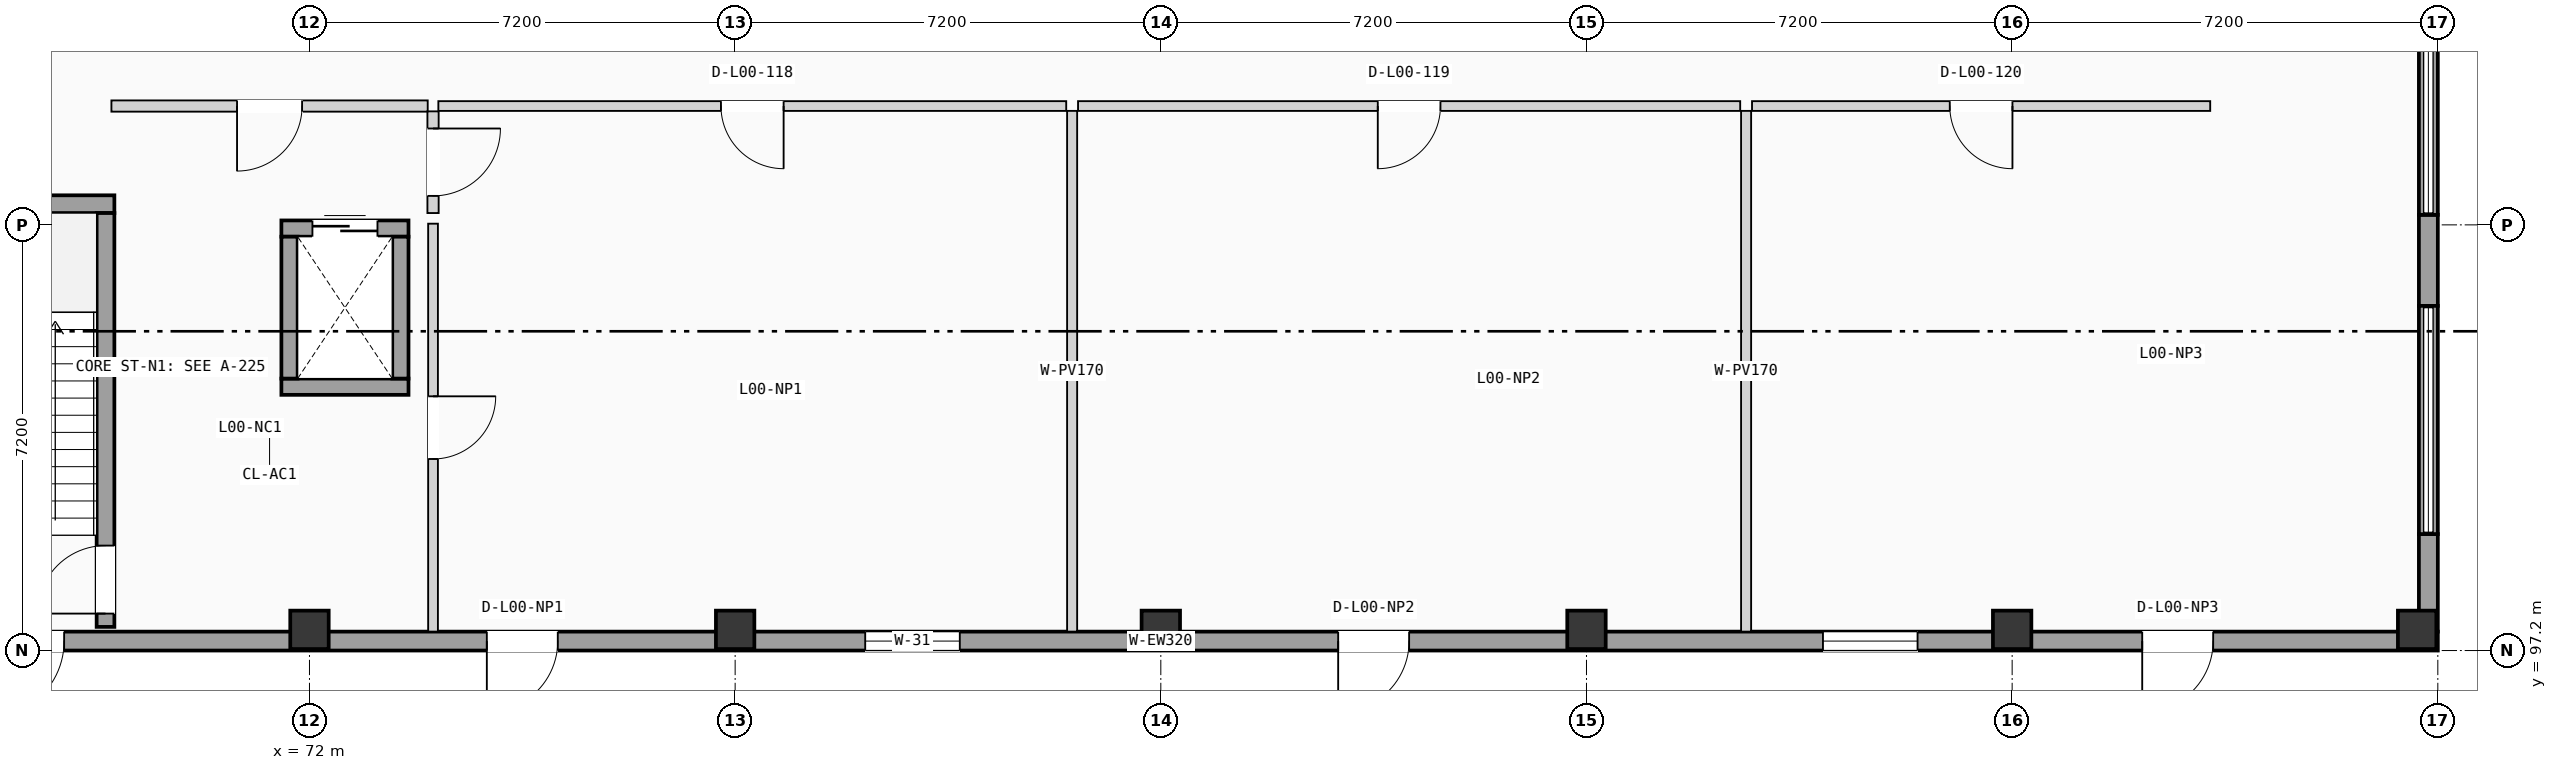
"""IFC4 building model, lengths in metres.
Left out: names, types, materials, properties, quantities, classifications, styles, units other than length and angle.
Written with IfcOpenShell. Run it as: python <this file> out.ifc"""

import sys

from ifc_helpers import new_model, si_unit, direction, frame, frame_2d, origin, origin_2d, place, context, subcontext, project, spatial, rectangle, circle, extrude, element, fill, save


model = new_model("IFC4")
c1 = context("Model", 3, precision=1e-05, world=origin(), true_north=direction((0.0, 1.0)))
c2 = subcontext(c1, "Body", "Model", "MODEL_VIEW")
j1 = project(units=[si_unit("LENGTHUNIT", "METRE"), si_unit("PLANEANGLEUNIT", "RADIAN")], contexts=[c1])
p1 = place(None, origin())
s1 = spatial("IfcSite", under=j1, at=p1, CompositionType="ELEMENT")
p2 = place(p1, origin())
s2 = spatial("IfcBuilding", under=s1, at=p2, CompositionType="ELEMENT")
p3 = place(p2, origin())
s3 = spatial("IfcBuildingStorey", under=s2, at=p3, CompositionType="ELEMENT", Elevation=0.0)
for number, where, z_axis, x_axis in (
    (1, (72.0, 97.55, 0.0), (0.0, 0.0, 1.0), (1.0, 0.0, 0.0)),
    (2, (79.2, 97.55, 0.0), (0.0, 0.0, 1.0), (1.0, 0.0, 0.0)),
    (3, (86.4, 97.55, 0.0), (0.0, 0.0, 1.0), (1.0, 0.0, 0.0)),
    (4, (93.6, 97.55, 0.0), (0.0, 0.0, 1.0), (1.0, 0.0, 0.0)),
    (5, (100.8, 97.55, 0.0), (0.0, 0.0, 1.0), (1.0, 0.0, 0.0)),
    (6, (107.65, 97.55, 0.0), (0.0, 0.0, 1.0), (1.0, 0.0, 0.0)),
):
    element("IfcColumn", number, at=place(p3, frame(where, z_axis=z_axis, x_axis=x_axis)), inside=s3, PredefinedType="COLUMN", context=c2, shape_type="SweptSolid", body=[
        extrude(circle(Radius=0.325, at=origin_2d()), origin(), (0.0, 0.0, 1.0), 4.9),
    ])
p4 = place(p3, frame((64.8, 97.36, 0.0), z_axis=(0.0, 0.0, 1.0), x_axis=(1.0, 0.0, 0.0)))
e7 = element("IfcWall", 7, at=p4, inside=s3, PredefinedType="SOLIDWALL", context=c2, shape_type="SweptSolid", body=[
    extrude(rectangle(XDim=43.2, YDim=0.32, at=frame_2d((21.6, 0.0))), origin(), (0.0, 0.0, 1.0), 4.63),
])
p5 = place(p4, frame((1.75, 0.0, 0.0)))
e8 = element("IfcOpeningElement", 8, at=p5, cuts=e7, PredefinedType="OPENING", context=c2, shape_type="SweptSolid", body=[
    extrude(rectangle(XDim=1.3, YDim=2.2, at=frame_2d((0.65, 1.1))), frame((0.0, 0.17, 0.0), z_axis=(0.0, -1.0, 0.0), x_axis=(1.0, 0.0, 0.0)), (0.0, 0.0, 1.0), 0.34),
])
p6 = place(p4, frame((10.2, 0.0, 0.0)))
e9 = element("IfcOpeningElement", 9, at=p6, cuts=e7, PredefinedType="OPENING", context=c2, shape_type="SweptSolid", body=[
    extrude(rectangle(XDim=1.2, YDim=2.15, at=frame_2d((0.6, 1.075))), frame((0.0, 0.17, 0.0), z_axis=(0.0, -1.0, 0.0), x_axis=(1.0, 0.0, 0.0)), (0.0, 0.0, 1.0), 0.34),
])
p7 = place(p4, frame((24.6, 0.0, 0.0)))
e10 = element("IfcOpeningElement", 10, at=p7, cuts=e7, PredefinedType="OPENING", context=c2, shape_type="SweptSolid", body=[
    extrude(rectangle(XDim=1.2, YDim=2.15, at=frame_2d((0.6, 1.075))), frame((0.0, 0.17, 0.0), z_axis=(0.0, -1.0, 0.0), x_axis=(1.0, 0.0, 0.0)), (0.0, 0.0, 1.0), 0.34),
])
p8 = place(p4, frame((38.2, 0.0, 0.0)))
e11 = element("IfcOpeningElement", 11, at=p8, cuts=e7, PredefinedType="OPENING", context=c2, shape_type="SweptSolid", body=[
    extrude(rectangle(XDim=1.2, YDim=2.15, at=frame_2d((0.6, 1.075))), frame((0.0, 0.17, 0.0), z_axis=(0.0, -1.0, 0.0), x_axis=(1.0, 0.0, 0.0)), (0.0, 0.0, 1.0), 0.34),
])
p9 = place(p4, frame((16.6, 0.0, 0.8)))
e12 = element("IfcOpeningElement", 12, at=p9, cuts=e7, PredefinedType="OPENING", context=c2, shape_type="SweptSolid", body=[
    extrude(rectangle(XDim=1.6, YDim=1.2, at=frame_2d((0.8, 0.6))), frame((0.0, 0.17, 0.0), z_axis=(0.0, -1.0, 0.0), x_axis=(1.0, 0.0, 0.0)), (0.0, 0.0, 1.0), 0.34),
])
p10 = place(p4, frame((32.8, 0.0, 0.8)))
e13 = element("IfcOpeningElement", 13, at=p10, cuts=e7, PredefinedType="OPENING", context=c2, shape_type="SweptSolid", body=[
    extrude(rectangle(XDim=1.6, YDim=1.2, at=frame_2d((0.8, 0.6))), frame((0.0, 0.17, 0.0), z_axis=(0.0, -1.0, 0.0), x_axis=(1.0, 0.0, 0.0)), (0.0, 0.0, 1.0), 0.34),
])
p11 = place(p3, frame((107.84, 97.52, 0.0), z_axis=(0.0, 0.0, 1.0), x_axis=(0.0, 1.0, 0.0)))
e14 = element("IfcWall", 14, at=p11, inside=s3, PredefinedType="SOLIDWALL", context=c2, shape_type="SweptSolid", body=[
    extrude(rectangle(XDim=1.65, YDim=0.32, at=frame_2d((0.825, 0.0))), origin(), (0.0, 0.0, 1.0), 4.63),
])
p12 = place(p3, frame((107.84, 103.03, 0.0), z_axis=(0.0, 0.0, 1.0), x_axis=(0.0, 1.0, 0.0)))
e15 = element("IfcWall", 15, at=p12, inside=s3, PredefinedType="SOLIDWALL", context=c2, shape_type="SweptSolid", body=[
    extrude(rectangle(XDim=1.54, YDim=0.32, at=frame_2d((0.77, 0.0))), origin(), (0.0, 0.0, 1.0), 4.63),
])
p13 = place(p3, frame((107.84, 99.17, 0.0), z_axis=(0.0, 0.0, 1.0), x_axis=(0.0, 1.0, 0.0)))
e16 = element("IfcWall", 16, at=p13, inside=s3, PredefinedType="SOLIDWALL", context=c2, shape_type="SweptSolid", body=[
    extrude(rectangle(XDim=3.86, YDim=0.32, at=frame_2d((1.93, 0.0))), origin(), (0.0, 0.0, 1.0), 1.11),
])
p14 = place(p3, frame((107.84, 104.57, 0.0), z_axis=(0.0, 0.0, 1.0), x_axis=(0.0, 1.0, 0.0)))
e17 = element("IfcWall", 17, at=p14, inside=s3, PredefinedType="SOLIDWALL", context=c2, shape_type="SweptSolid", body=[
    extrude(rectangle(XDim=3.86, YDim=0.32, at=frame_2d((1.93, 0.0))), origin(), (0.0, 0.0, 1.0), 1.11),
])
p15 = place(p3, frame((65.1, 104.75, 0.0), z_axis=(0.0, 0.0, 1.0), x_axis=(1.0, 0.0, 0.0)))
e18 = element("IfcWall", 18, at=p15, inside=s3, PredefinedType="SHEAR", context=c2, shape_type="SweptSolid", body=[
    extrude(rectangle(XDim=3.6, YDim=0.3, at=frame_2d((1.8, 0.0))), origin(), (0.0, 0.0, 1.0), 4.63),
])
p16 = place(p3, frame((68.55, 97.6, 0.0), z_axis=(0.0, 0.0, 1.0), x_axis=(0.0, 1.0, 0.0)))
e19 = element("IfcWall", 19, at=p16, inside=s3, PredefinedType="SHEAR", context=c2, shape_type="SweptSolid", body=[
    extrude(rectangle(XDim=7.0, YDim=0.3, at=frame_2d((3.5, 0.0))), origin(), (0.0, 0.0, 1.0), 4.63),
])
p17 = place(p16, frame((0.225, 0.0, 0.0)))
e20 = element("IfcOpeningElement", 20, at=p17, cuts=e19, PredefinedType="OPENING", context=c2, shape_type="SweptSolid", body=[
    extrude(rectangle(XDim=1.15, YDim=2.12, at=frame_2d((0.575, 1.06))), frame((0.0, 0.16, 0.0), z_axis=(0.0, -1.0, 0.0), x_axis=(1.0, 0.0, 0.0)), (0.0, 0.0, 1.0), 0.32),
])
p18 = place(p3, frame((71.525, 101.663, 0.0), z_axis=(0.0, 0.0, 1.0), x_axis=(1.0, 0.0, 0.0)))
e21 = element("IfcWall", 21, at=p18, inside=s3, PredefinedType="SHEAR", context=c2, shape_type="SweptSolid", body=[
    extrude(rectangle(XDim=2.15, YDim=0.275, at=frame_2d((1.075, 0.0))), origin(), (0.0, 0.0, 1.0), 4.63),
])
p19 = place(p3, frame((71.525, 104.337, 0.0), z_axis=(0.0, 0.0, 1.0), x_axis=(1.0, 0.0, 0.0)))
e22 = element("IfcWall", 22, at=p19, inside=s3, PredefinedType="SHEAR", context=c2, shape_type="SweptSolid", body=[
    extrude(rectangle(XDim=2.15, YDim=0.275, at=frame_2d((1.075, 0.0))), origin(), (0.0, 0.0, 1.0), 4.63),
])
p20 = place(p19, frame((0.525, 0.0, 0.0)))
e23 = element("IfcOpeningElement", 23, at=p20, cuts=e22, PredefinedType="OPENING", context=c2, shape_type="SweptSolid", body=[
    extrude(rectangle(XDim=1.1, YDim=2.15, at=frame_2d((0.55, 1.075))), frame((0.0, 0.147, 0.0), z_axis=(0.0, -1.0, 0.0), x_axis=(1.0, 0.0, 0.0)), (0.0, 0.0, 1.0), 0.295),
])
for number, where, z_axis, x_axis in (
    (24, (71.663, 101.8, 0.0), (0.0, 0.0, 1.0), (0.0, 1.0, 0.0)),
    (25, (73.538, 101.8, 0.0), (0.0, 0.0, 1.0), (0.0, 1.0, 0.0)),
):
    element("IfcWall", number, at=place(p3, frame(where, z_axis=z_axis, x_axis=x_axis)), inside=s3, PredefinedType="SHEAR", context=c2, shape_type="SweptSolid", body=[
        extrude(rectangle(XDim=2.4, YDim=0.275, at=frame_2d((1.2, 0.0))), origin(), (0.0, 0.0, 1.0), 4.63),
    ])
p21 = place(p3, frame((74.09, 97.52, 0.0), z_axis=(0.0, 0.0, 1.0), x_axis=(0.0, 1.0, 0.0)))
e26 = element("IfcWall", 26, at=p21, inside=s3, PredefinedType="PARTITIONING", context=c2, shape_type="SweptSolid", body=[
    extrude(rectangle(XDim=6.9, YDim=0.165, at=frame_2d((3.45, 0.0))), origin(), (0.0, 0.0, 1.0), 3.84),
])
p22 = place(p21, frame((2.92, 0.0, 0.0)))
e27 = element("IfcOpeningElement", 27, at=p22, cuts=e26, PredefinedType="OPENING", context=c2, shape_type="SweptSolid", body=[
    extrude(rectangle(XDim=1.06, YDim=2.14, at=frame_2d((0.53, 1.07))), frame((0.0, 0.093, 0.0), z_axis=(0.0, -1.0, 0.0), x_axis=(1.0, 0.0, 0.0)), (0.0, 0.0, 1.0), 0.185),
])
p23 = place(p3, frame((68.65, 106.41, 0.0), z_axis=(0.0, 0.0, 1.0), x_axis=(1.0, 0.0, 0.0)))
e28 = element("IfcWall", 28, at=p23, inside=s3, PredefinedType="PARTITIONING", context=c2, shape_type="SweptSolid", body=[
    extrude(rectangle(XDim=5.35, YDim=0.19, at=frame_2d((2.675, 0.0))), origin(), (0.0, 0.0, 1.0), 3.84),
])
p24 = place(p23, frame((2.125, 0.0, 0.0)))
e29 = element("IfcOpeningElement", 29, at=p24, cuts=e28, PredefinedType="OPENING", context=c2, shape_type="SweptSolid", body=[
    extrude(rectangle(XDim=1.1, YDim=2.12, at=frame_2d((0.55, 1.06))), frame((0.0, 0.105, 0.0), z_axis=(0.0, -1.0, 0.0), x_axis=(1.0, 0.0, 0.0)), (0.0, 0.0, 1.0), 0.21),
])
p25 = place(p3, frame((74.09, 104.6, 0.0), z_axis=(0.0, 0.0, 1.0), x_axis=(0.0, 1.0, 0.0)))
e30 = element("IfcWall", 30, at=p25, inside=s3, PredefinedType="PARTITIONING", context=c2, shape_type="SweptSolid", body=[
    extrude(rectangle(XDim=1.72, YDim=0.19, at=frame_2d((0.86, 0.0))), origin(), (0.0, 0.0, 1.0), 3.84),
])
p26 = place(p25, frame((0.29, 0.0, 0.0)))
e31 = element("IfcOpeningElement", 31, at=p26, cuts=e30, PredefinedType="OPENING", context=c2, shape_type="SweptSolid", body=[
    extrude(rectangle(XDim=1.14, YDim=2.18, at=frame_2d((0.57, 1.09))), frame((0.0, 0.105, 0.0), z_axis=(0.0, -1.0, 0.0), x_axis=(1.0, 0.0, 0.0)), (0.0, 0.0, 1.0), 0.21),
])
p27 = place(p3, frame((74.18, 106.41, 0.0), z_axis=(0.0, 0.0, 1.0), x_axis=(1.0, 0.0, 0.0)))
e32 = element("IfcWall", 32, at=p27, inside=s3, PredefinedType="PARTITIONING", context=c2, shape_type="SweptSolid", body=[
    extrude(rectangle(XDim=10.62, YDim=0.165, at=frame_2d((5.31, 0.0))), origin(), (0.0, 0.0, 1.0), 3.84),
])
p28 = place(p27, frame((4.78, 0.0, 0.0)))
e33 = element("IfcOpeningElement", 33, at=p28, cuts=e32, PredefinedType="OPENING", context=c2, shape_type="SweptSolid", body=[
    extrude(rectangle(XDim=1.06, YDim=2.14, at=frame_2d((0.53, 1.07))), frame((0.0, 0.093, 0.0), z_axis=(0.0, -1.0, 0.0), x_axis=(1.0, 0.0, 0.0)), (0.0, 0.0, 1.0), 0.185),
])
p29 = place(p3, frame((85.0, 106.41, 0.0), z_axis=(0.0, 0.0, 1.0), x_axis=(1.0, 0.0, 0.0)))
e34 = element("IfcWall", 34, at=p29, inside=s3, PredefinedType="PARTITIONING", context=c2, shape_type="SweptSolid", body=[
    extrude(rectangle(XDim=11.2, YDim=0.165, at=frame_2d((5.6, 0.0))), origin(), (0.0, 0.0, 1.0), 3.84),
])
p30 = place(p29, frame((5.07, 0.0, 0.0)))
e35 = element("IfcOpeningElement", 35, at=p30, cuts=e34, PredefinedType="OPENING", context=c2, shape_type="SweptSolid", body=[
    extrude(rectangle(XDim=1.06, YDim=2.14, at=frame_2d((0.53, 1.07))), frame((0.0, 0.093, 0.0), z_axis=(0.0, -1.0, 0.0), x_axis=(1.0, 0.0, 0.0)), (0.0, 0.0, 1.0), 0.185),
])
p31 = place(p3, frame((96.4, 106.41, 0.0), z_axis=(0.0, 0.0, 1.0), x_axis=(1.0, 0.0, 0.0)))
e36 = element("IfcWall", 36, at=p31, inside=s3, PredefinedType="PARTITIONING", context=c2, shape_type="SweptSolid", body=[
    extrude(rectangle(XDim=7.75, YDim=0.165, at=frame_2d((3.875, 0.0))), origin(), (0.0, 0.0, 1.0), 3.84),
])
p32 = place(p31, frame((3.345, 0.0, 0.0)))
e37 = element("IfcOpeningElement", 37, at=p32, cuts=e36, PredefinedType="OPENING", context=c2, shape_type="SweptSolid", body=[
    extrude(rectangle(XDim=1.06, YDim=2.14, at=frame_2d((0.53, 1.07))), frame((0.0, 0.093, 0.0), z_axis=(0.0, -1.0, 0.0), x_axis=(1.0, 0.0, 0.0)), (0.0, 0.0, 1.0), 0.185),
])
for number, where, z_axis, x_axis in (
    (38, (84.9, 97.52, 0.0), (0.0, 0.0, 1.0), (0.0, 1.0, 0.0)),
    (39, (96.3, 97.52, 0.0), (0.0, 0.0, 1.0), (0.0, 1.0, 0.0)),
):
    element("IfcWall", number, at=place(p3, frame(where, z_axis=z_axis, x_axis=x_axis)), inside=s3, PredefinedType="PARTITIONING", context=c2, shape_type="SweptSolid", body=[
        extrude(rectangle(XDim=8.808, YDim=0.17, at=frame_2d((4.404, 0.0))), origin(), (0.0, 0.0, 1.0), 3.84),
    ])
p33 = place(p5, frame((1.3, 0.0, 0.0), z_axis=(0.0, 0.0, 1.0), x_axis=(-1.0, 0.0, 0.0)))
e40 = element("IfcDoor", 40, at=p33, inside=s3, OperationType="SINGLE_SWING_LEFT", PredefinedType="DOOR", context=c2, shape_type="SweptSolid", body=[
    extrude(rectangle(XDim=1.3, YDim=2.2, at=frame_2d((0.65, 1.1))), frame((0.0, 0.025, 0.0), z_axis=(0.0, -1.0, 0.0), x_axis=(1.0, 0.0, 0.0)), (0.0, 0.0, 1.0), 0.05),
])
fill(e8, e40)
p34 = place(p6, frame((1.2, 0.0, 0.0), z_axis=(0.0, 0.0, 1.0), x_axis=(-1.0, 0.0, 0.0)))
e41 = element("IfcDoor", 41, at=p34, inside=s3, OperationType="SINGLE_SWING_LEFT", PredefinedType="DOOR", context=c2, shape_type="SweptSolid", body=[
    extrude(rectangle(XDim=1.2, YDim=2.15, at=frame_2d((0.6, 1.075))), frame((0.0, 0.025, 0.0), z_axis=(0.0, -1.0, 0.0), x_axis=(1.0, 0.0, 0.0)), (0.0, 0.0, 1.0), 0.05),
])
fill(e9, e41)
p35 = place(p7, frame((1.2, 0.0, 0.0), z_axis=(0.0, 0.0, 1.0), x_axis=(-1.0, 0.0, 0.0)))
e42 = element("IfcDoor", 42, at=p35, inside=s3, OperationType="SINGLE_SWING_LEFT", PredefinedType="DOOR", context=c2, shape_type="SweptSolid", body=[
    extrude(rectangle(XDim=1.2, YDim=2.15, at=frame_2d((0.6, 1.075))), frame((0.0, 0.025, 0.0), z_axis=(0.0, -1.0, 0.0), x_axis=(1.0, 0.0, 0.0)), (0.0, 0.0, 1.0), 0.05),
])
fill(e10, e42)
p36 = place(p8, frame((1.2, 0.0, 0.0), z_axis=(0.0, 0.0, 1.0), x_axis=(-1.0, 0.0, 0.0)))
e43 = element("IfcDoor", 43, at=p36, inside=s3, OperationType="SINGLE_SWING_LEFT", PredefinedType="DOOR", context=c2, shape_type="SweptSolid", body=[
    extrude(rectangle(XDim=1.2, YDim=2.15, at=frame_2d((0.6, 1.075))), frame((0.0, 0.025, 0.0), z_axis=(0.0, -1.0, 0.0), x_axis=(1.0, 0.0, 0.0)), (0.0, 0.0, 1.0), 0.05),
])
fill(e11, e43)
p37 = place(p9, origin())
e44 = element("IfcWindow", 44, at=p37, inside=s3, PartitioningType="DOUBLE_PANEL_VERTICAL", PredefinedType="WINDOW", context=c2, shape_type="SweptSolid", body=[
    extrude(rectangle(XDim=1.6, YDim=1.2, at=frame_2d((0.8, 0.6))), frame((0.0, 0.03, 0.0), z_axis=(0.0, -1.0, 0.0), x_axis=(1.0, 0.0, 0.0)), (0.0, 0.0, 1.0), 0.06),
])
fill(e12, e44)
p38 = place(p10, origin())
e45 = element("IfcWindow", 45, at=p38, inside=s3, PartitioningType="DOUBLE_PANEL_VERTICAL", PredefinedType="WINDOW", context=c2, shape_type="SweptSolid", body=[
    extrude(rectangle(XDim=1.6, YDim=1.2, at=frame_2d((0.8, 0.6))), frame((0.0, 0.03, 0.0), z_axis=(0.0, -1.0, 0.0), x_axis=(1.0, 0.0, 0.0)), (0.0, 0.0, 1.0), 0.06),
])
fill(e13, e45)
p39 = place(p17, origin())
e46 = element("IfcDoor", 46, at=p39, inside=s3, OperationType="SINGLE_SWING_LEFT", PredefinedType="DOOR", context=c2, shape_type="SweptSolid", body=[
    extrude(rectangle(XDim=1.15, YDim=2.12, at=frame_2d((0.575, 1.06))), frame((0.0, 0.025, 0.0), z_axis=(0.0, -1.0, 0.0), x_axis=(1.0, 0.0, 0.0)), (0.0, 0.0, 1.0), 0.05),
])
fill(e20, e46)
p40 = place(p20, origin())
e47 = element("IfcDoor", 47, at=p40, inside=s3, OperationType="SLIDING_TO_LEFT", PredefinedType="DOOR", context=c2, shape_type="SweptSolid", body=[
    extrude(rectangle(XDim=1.1, YDim=2.15, at=frame_2d((0.55, 1.075))), frame((0.0, 0.025, 0.0), z_axis=(0.0, -1.0, 0.0), x_axis=(1.0, 0.0, 0.0)), (0.0, 0.0, 1.0), 0.05),
])
fill(e23, e47)
p41 = place(p22, frame((1.06, 0.0, 0.0), z_axis=(0.0, 0.0, 1.0), x_axis=(-1.0, 0.0, 0.0)))
e48 = element("IfcDoor", 48, at=p41, inside=s3, OperationType="SINGLE_SWING_RIGHT", PredefinedType="DOOR", context=c2, shape_type="SweptSolid", body=[
    extrude(rectangle(XDim=1.06, YDim=2.14, at=frame_2d((0.53, 1.07))), frame((0.0, 0.025, 0.0), z_axis=(0.0, -1.0, 0.0), x_axis=(1.0, 0.0, 0.0)), (0.0, 0.0, 1.0), 0.05),
])
fill(e27, e48)
p42 = place(p24, frame((1.1, 0.0, 0.0), z_axis=(0.0, 0.0, 1.0), x_axis=(-1.0, 0.0, 0.0)))
e49 = element("IfcDoor", 49, at=p42, inside=s3, OperationType="SINGLE_SWING_LEFT", PredefinedType="DOOR", context=c2, shape_type="SweptSolid", body=[
    extrude(rectangle(XDim=1.1, YDim=2.12, at=frame_2d((0.55, 1.06))), frame((0.0, 0.025, 0.0), z_axis=(0.0, -1.0, 0.0), x_axis=(1.0, 0.0, 0.0)), (0.0, 0.0, 1.0), 0.05),
])
fill(e29, e49)
p43 = place(p26, frame((1.14, 0.0, 0.0), z_axis=(0.0, 0.0, 1.0), x_axis=(-1.0, 0.0, 0.0)))
e50 = element("IfcDoor", 50, at=p43, inside=s3, OperationType="SINGLE_SWING_RIGHT", PredefinedType="DOOR", context=c2, shape_type="SweptSolid", body=[
    extrude(rectangle(XDim=1.14, YDim=2.18, at=frame_2d((0.57, 1.09))), frame((0.0, 0.025, 0.0), z_axis=(0.0, -1.0, 0.0), x_axis=(1.0, 0.0, 0.0)), (0.0, 0.0, 1.0), 0.05),
])
fill(e31, e50)
p44 = place(p28, frame((1.06, 0.0, 0.0), z_axis=(0.0, 0.0, 1.0), x_axis=(-1.0, 0.0, 0.0)))
e51 = element("IfcDoor", 51, at=p44, inside=s3, OperationType="SINGLE_SWING_RIGHT", PredefinedType="DOOR", context=c2, shape_type="SweptSolid", body=[
    extrude(rectangle(XDim=1.06, YDim=2.14, at=frame_2d((0.53, 1.07))), frame((0.0, 0.025, 0.0), z_axis=(0.0, -1.0, 0.0), x_axis=(1.0, 0.0, 0.0)), (0.0, 0.0, 1.0), 0.05),
])
fill(e33, e51)
p45 = place(p30, frame((1.06, 0.0, 0.0), z_axis=(0.0, 0.0, 1.0), x_axis=(-1.0, 0.0, 0.0)))
e52 = element("IfcDoor", 52, at=p45, inside=s3, OperationType="SINGLE_SWING_LEFT", PredefinedType="DOOR", context=c2, shape_type="SweptSolid", body=[
    extrude(rectangle(XDim=1.06, YDim=2.14, at=frame_2d((0.53, 1.07))), frame((0.0, 0.025, 0.0), z_axis=(0.0, -1.0, 0.0), x_axis=(1.0, 0.0, 0.0)), (0.0, 0.0, 1.0), 0.05),
])
fill(e35, e52)
p46 = place(p32, frame((1.06, 0.0, 0.0), z_axis=(0.0, 0.0, 1.0), x_axis=(-1.0, 0.0, 0.0)))
e53 = element("IfcDoor", 53, at=p46, inside=s3, OperationType="SINGLE_SWING_RIGHT", PredefinedType="DOOR", context=c2, shape_type="SweptSolid", body=[
    extrude(rectangle(XDim=1.06, YDim=2.14, at=frame_2d((0.53, 1.07))), frame((0.0, 0.025, 0.0), z_axis=(0.0, -1.0, 0.0), x_axis=(1.0, 0.0, 0.0)), (0.0, 0.0, 1.0), 0.05),
])
fill(e37, e53)
save(model, sys.argv[1])
